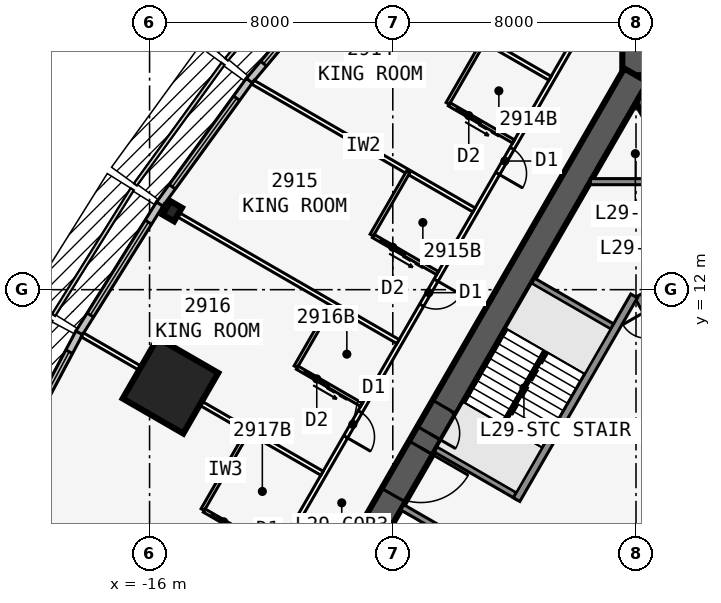
"""IFC4 building model, lengths in metres.
Left out: names, types, materials, properties, quantities, classifications, styles, units other than length and angle.
Written with IfcOpenShell. Run it as: python <this file> out.ifc"""

import sys

from ifc_helpers import new_model, si_unit, direction, frame, frame_2d, origin, origin_2d, place, context, subcontext, project, spatial, rectangle, i_section, extrude, element, fill, save


model = new_model("IFC4")
c1 = context("Model", 3, precision=1e-05, world=origin(), true_north=direction((0.0, 1.0)))
c2 = subcontext(c1, "Body", "Model", "MODEL_VIEW")
j1 = project(units=[si_unit("LENGTHUNIT", "METRE"), si_unit("PLANEANGLEUNIT", "RADIAN")], contexts=[c1])
p1 = place(None, origin())
s1 = spatial("IfcSite", under=j1, at=p1, CompositionType="ELEMENT")
p2 = place(p1, origin())
s2 = spatial("IfcBuilding", under=s1, at=p2, CompositionType="ELEMENT")
p3 = place(p2, frame((0.0, 0.0, 114.7)))
s3 = spatial("IfcBuildingStorey", under=s2, at=p3, CompositionType="ELEMENT", Elevation=114.7)
p4 = place(p3, frame((16.5, -9.526, 0.0), z_axis=(0.0, 0.0, 1.0), x_axis=(-0.499999749417, 0.866025548458, 0.0)))
e1 = element("IfcWall", 1, at=p4, inside=s3, PredefinedType="SHEAR", context=c2, shape_type="SweptSolid", body=[
    extrude(rectangle(XDim=33.0, YDim=0.9, at=frame_2d((16.5, 0.0))), origin(), (0.0, 0.0, 1.0), 3.4),
])
p5 = place(p4, frame((14.15, 0.0, 0.0)))
e2 = element("IfcOpeningElement", 2, at=p5, cuts=e1, PredefinedType="OPENING", context=c2, shape_type="SweptSolid", body=[
    extrude(rectangle(XDim=1.8, YDim=2.13, at=frame_2d((0.9, 1.065))), frame((0.0, 0.46, 0.0), z_axis=(0.0, -1.0, 0.0), x_axis=(1.0, 0.0, 0.0)), (0.0, 0.0, 1.0), 0.92),
])
p6 = place(p4, frame((12.6, 0.0, 0.0)))
e3 = element("IfcOpeningElement", 3, at=p6, cuts=e1, PredefinedType="OPENING", context=c2, shape_type="SweptSolid", body=[
    extrude(rectangle(XDim=1.0, YDim=2.13, at=frame_2d((0.5, 1.065))), frame((0.0, 0.46, 0.0), z_axis=(0.0, -1.0, 0.0), x_axis=(1.0, 0.0, 0.0)), (0.0, 0.0, 1.0), 0.92),
])
p7 = place(p3, frame((5.379, 2.586, 0.0), z_axis=(0.0, 0.0, 1.0), x_axis=(-0.500001375892, 0.866024609411, 0.0)))
e4 = element("IfcWall", 4, at=p7, inside=s3, PredefinedType="SOLIDWALL", context=c2, shape_type="SweptSolid", body=[
    extrude(rectangle(XDim=10.633, YDim=0.25, at=frame_2d((5.316, 0.0))), origin(), (0.0, 0.0, 1.0), 3.235),
])
p8 = place(p7, frame((9.164, 0.0, 0.0)))
e5 = element("IfcOpeningElement", 5, at=p8, cuts=e4, PredefinedType="OPENING", context=c2, shape_type="SweptSolid", body=[
    extrude(rectangle(XDim=0.9, YDim=2.13, at=frame_2d((0.45, 1.065))), frame((0.0, 0.135, 0.0), z_axis=(0.0, -1.0, 0.0), x_axis=(1.0, 0.0, 0.0)), (0.0, 0.0, 1.0), 0.27),
])
p9 = place(p7, frame((1.0, 0.0, 0.0)))
e6 = element("IfcOpeningElement", 6, at=p9, cuts=e4, PredefinedType="OPENING", context=c2, shape_type="SweptSolid", body=[
    extrude(rectangle(XDim=1.1, YDim=2.13, at=frame_2d((0.55, 1.065))), frame((0.0, 0.135, 0.0), z_axis=(0.0, -1.0, 0.0), x_axis=(1.0, 0.0, 0.0)), (0.0, 0.0, 1.0), 0.27),
])
p10 = place(p7, frame((3.9, 0.0, 0.0)))
e7 = element("IfcOpeningElement", 7, at=p10, cuts=e4, PredefinedType="OPENING", context=c2, shape_type="SweptSolid", body=[
    extrude(rectangle(XDim=1.1, YDim=2.13, at=frame_2d((0.55, 1.065))), frame((0.0, 0.135, 0.0), z_axis=(0.0, -1.0, 0.0), x_axis=(1.0, 0.0, 0.0)), (0.0, 0.0, 1.0), 0.27),
])
p11 = place(p7, frame((6.8, 0.0, 0.0)))
e8 = element("IfcOpeningElement", 8, at=p11, cuts=e4, PredefinedType="OPENING", context=c2, shape_type="SweptSolid", body=[
    extrude(rectangle(XDim=1.1, YDim=2.13, at=frame_2d((0.55, 1.065))), frame((0.0, 0.135, 0.0), z_axis=(0.0, -1.0, 0.0), x_axis=(1.0, 0.0, 0.0)), (0.0, 0.0, 1.0), 0.27),
])
p12 = place(p3, frame((0.0, 19.052, 0.0), z_axis=(0.0, 0.0, 1.0), x_axis=(-0.499999749417, -0.866025548458, 0.0)))
e9 = element("IfcWall", 9, at=p12, inside=s3, PredefinedType="SHEAR", context=c2, shape_type="SweptSolid", body=[
    extrude(rectangle(XDim=33.0, YDim=0.9, at=frame_2d((16.5, 0.0))), origin(), (0.0, 0.0, 1.0), 3.4),
])
p13 = place(p12, frame((14.15, 0.0, 0.0)))
e10 = element("IfcOpeningElement", 10, at=p13, cuts=e9, PredefinedType="OPENING", context=c2, shape_type="SweptSolid", body=[
    extrude(rectangle(XDim=1.8, YDim=2.13, at=frame_2d((0.9, 1.065))), frame((0.0, 0.46, 0.0), z_axis=(0.0, -1.0, 0.0), x_axis=(1.0, 0.0, 0.0)), (0.0, 0.0, 1.0), 0.92),
])
p14 = place(p12, frame((12.6, 0.0, 0.0)))
e11 = element("IfcOpeningElement", 11, at=p14, cuts=e9, PredefinedType="OPENING", context=c2, shape_type="SweptSolid", body=[
    extrude(rectangle(XDim=1.0, YDim=2.13, at=frame_2d((0.5, 1.065))), frame((0.0, 0.46, 0.0), z_axis=(0.0, -1.0, 0.0), x_axis=(1.0, 0.0, 0.0)), (0.0, 0.0, 1.0), 0.92),
])
p15 = place(p3, frame((-0.062, 11.794, 0.0), z_axis=(0.0, 0.0, 1.0), x_axis=(-0.500006680225, -0.86602154692, 0.0)))
e12 = element("IfcWall", 12, at=p15, inside=s3, PredefinedType="SOLIDWALL", context=c2, shape_type="SweptSolid", body=[
    extrude(rectangle(XDim=7.733, YDim=0.25, at=frame_2d((3.866, 0.0))), origin(), (0.0, 0.0, 1.0), 3.235),
])
for number, where, z_axis, x_axis in (
    (13, (-0.679, 10.727, 0.0), (0.0, 0.0, 1.0), (-0.866, 0.5, 0.0)),
    (14, (-3.879, 5.184, 0.0), (0.0, 0.0, 1.0), (-0.866, 0.5, 0.0)),
    (15, (-4.979, 3.279, 0.0), (0.0, 0.0, 1.0), (-0.866, 0.5, 0.0)),
):
    element("IfcWall", number, at=place(p3, frame(where, z_axis=z_axis, x_axis=x_axis)), inside=s3, PredefinedType="SOLIDWALL", context=c2, shape_type="SweptSolid", body=[
        extrude(rectangle(XDim=3.125, YDim=0.2, at=frame_2d((1.562, 0.0))), origin(), (0.0, 0.0, 1.0), 3.235),
    ])
p16 = place(p3, frame((0.0, 19.052, 0.0), z_axis=(0.0, 0.0, 1.0), x_axis=(0.0, 1.0, 0.0)))
e16 = element("IfcWall", 16, at=p16, inside=s3, PredefinedType="SHEAR", context=c2, shape_type="SweptSolid", body=[
    extrude(rectangle(XDim=4.746, YDim=0.9, at=frame_2d((2.373, 0.0))), origin(), (0.0, 0.0, 1.0), 3.4),
])
p17 = place(p16, frame((1.8, 0.0, 0.0)))
e17 = element("IfcOpeningElement", 17, at=p17, cuts=e16, PredefinedType="OPENING", context=c2, shape_type="SweptSolid", body=[
    extrude(rectangle(XDim=1.8, YDim=2.13, at=frame_2d((0.9, 1.065))), frame((0.0, 0.46, 0.0), z_axis=(0.0, -1.0, 0.0), x_axis=(1.0, 0.0, 0.0)), (0.0, 0.0, 1.0), 0.92),
])
p18 = place(p3, frame((-15.254, 14.58, 0.0), z_axis=(0.0, 0.0, 1.0), x_axis=(-0.866025403784, 0.5, 0.0)))
e18 = element("IfcColumn", 18, at=p18, inside=s3, PredefinedType="COLUMN", context=c2, shape_type="SweptSolid", body=[
    extrude(i_section(OverallWidth=0.437, OverallDepth=0.513, WebThickness=0.061, FlangeThickness=0.097, at=origin_2d()), origin(), (0.0, 0.0, 1.0), 3.4),
])
p19 = place(p3, frame((-15.312, 8.84, 0.0), z_axis=(0.0, 0.0, 1.0), x_axis=(-0.866025403784, 0.5, 0.0)))
e19 = element("IfcColumn", 19, at=p19, inside=s3, PredefinedType="COLUMN", context=c2, shape_type="SweptSolid", body=[
    extrude(rectangle(XDim=2.3, YDim=2.3, at=origin_2d()), origin(), (0.0, 0.0, 1.0), 3.4),
])
p20 = place(p3, frame((-9.465, 22.76, 0.0), z_axis=(0.0, 0.0, 1.0), x_axis=(-0.641810386606, -0.766863369607, 0.0)))
e20 = element("IfcWall", 20, at=p20, inside=s3, PredefinedType="STANDARD", context=c2, shape_type="SweptSolid", body=[
    extrude(rectangle(XDim=5.076, YDim=0.25, at=frame_2d((2.538, 0.0))), origin(), (0.0, 0.0, 1.0), 3.235),
])
p21 = place(p20, frame((0.738, 0.0, 0.45)))
e21 = element("IfcOpeningElement", 21, at=p21, cuts=e20, PredefinedType="OPENING", context=c2, shape_type="SweptSolid", body=[
    extrude(rectangle(XDim=3.6, YDim=2.4, at=frame_2d((1.8, 1.2))), frame((0.0, 0.135, 0.0), z_axis=(0.0, -1.0, 0.0), x_axis=(1.0, 0.0, 0.0)), (0.0, 0.0, 1.0), 0.27),
])
p22 = place(p3, frame((-12.718, 18.875, 0.0), z_axis=(0.0, 0.0, 1.0), x_axis=(-0.587669188412, -0.809101307001, 0.0)))
e22 = element("IfcWall", 22, at=p22, inside=s3, PredefinedType="STANDARD", context=c2, shape_type="SweptSolid", body=[
    extrude(rectangle(XDim=5.028, YDim=0.25, at=frame_2d((2.514, 0.0))), origin(), (0.0, 0.0, 1.0), 3.235),
])
p23 = place(p22, frame((0.714, 0.0, 0.45)))
e23 = element("IfcOpeningElement", 23, at=p23, cuts=e22, PredefinedType="OPENING", context=c2, shape_type="SweptSolid", body=[
    extrude(rectangle(XDim=3.6, YDim=2.4, at=frame_2d((1.8, 1.2))), frame((0.0, 0.135, 0.0), z_axis=(0.0, -1.0, 0.0), x_axis=(1.0, 0.0, 0.0)), (0.0, 0.0, 1.0), 0.27),
])
p24 = place(p3, frame((-15.667, 14.814, 0.0), z_axis=(0.0, 0.0, 1.0), x_axis=(-0.529990167382, -0.84800378683, 0.0)))
e24 = element("IfcWall", 24, at=p24, inside=s3, PredefinedType="STANDARD", context=c2, shape_type="SweptSolid", body=[
    extrude(rectangle(XDim=5.003, YDim=0.25, at=frame_2d((2.501, 0.0))), origin(), (0.0, 0.0, 1.0), 3.235),
])
p25 = place(p24, frame((0.701, 0.0, 0.45)))
e25 = element("IfcOpeningElement", 25, at=p25, cuts=e24, PredefinedType="OPENING", context=c2, shape_type="SweptSolid", body=[
    extrude(rectangle(XDim=3.6, YDim=2.4, at=frame_2d((1.8, 1.2))), frame((0.0, 0.135, 0.0), z_axis=(0.0, -1.0, 0.0), x_axis=(1.0, 0.0, 0.0)), (0.0, 0.0, 1.0), 0.27),
])
p26 = place(p3, frame((-18.314, 10.579, 0.0), z_axis=(0.0, 0.0, 1.0), x_axis=(-0.469404966864, -0.882982999317, 0.0)))
e26 = element("IfcWall", 26, at=p26, inside=s3, PredefinedType="STANDARD", context=c2, shape_type="SweptSolid", body=[
    extrude(rectangle(XDim=5.003, YDim=0.25, at=frame_2d((2.501, 0.0))), origin(), (0.0, 0.0, 1.0), 3.235),
])
p27 = place(p26, frame((0.701, 0.0, 0.45)))
e27 = element("IfcOpeningElement", 27, at=p27, cuts=e26, PredefinedType="OPENING", context=c2, shape_type="SweptSolid", body=[
    extrude(rectangle(XDim=3.6, YDim=2.4, at=frame_2d((1.8, 1.2))), frame((0.0, 0.135, 0.0), z_axis=(0.0, -1.0, 0.0), x_axis=(1.0, 0.0, 0.0)), (0.0, 0.0, 1.0), 0.27),
])
p28 = place(p3, frame((-0.5, 22.836, 0.0), z_axis=(0.0, 0.0, 1.0), x_axis=(-0.500001677587, -0.866024435227, 0.0)))
e28 = element("IfcWall", 28, at=p28, inside=s3, PredefinedType="PARTITIONING", context=c2, shape_type="SweptSolid", body=[
    extrude(rectangle(XDim=39.054, YDim=0.15, at=frame_2d((19.527, 0.0))), origin(), (0.0, 0.0, 1.0), 3.235),
])
p29 = place(p28, frame((0.352, 0.0, 0.0)))
e29 = element("IfcOpeningElement", 29, at=p29, cuts=e28, PredefinedType="OPENING", context=c2, shape_type="SweptSolid", body=[
    extrude(rectangle(XDim=0.95, YDim=2.13, at=frame_2d((0.475, 1.065))), frame((0.0, 0.085, 0.0), z_axis=(0.0, -1.0, 0.0), x_axis=(1.0, 0.0, 0.0)), (0.0, 0.0, 1.0), 0.17),
])
p30 = place(p28, frame((7.152, 0.0, 0.0)))
e30 = element("IfcOpeningElement", 30, at=p30, cuts=e28, PredefinedType="OPENING", context=c2, shape_type="SweptSolid", body=[
    extrude(rectangle(XDim=0.95, YDim=2.13, at=frame_2d((0.475, 1.065))), frame((0.0, 0.085, 0.0), z_axis=(0.0, -1.0, 0.0), x_axis=(1.0, 0.0, 0.0)), (0.0, 0.0, 1.0), 0.17),
])
p31 = place(p28, frame((12.152, 0.0, 0.0)))
e31 = element("IfcOpeningElement", 31, at=p31, cuts=e28, PredefinedType="OPENING", context=c2, shape_type="SweptSolid", body=[
    extrude(rectangle(XDim=0.95, YDim=2.13, at=frame_2d((0.475, 1.065))), frame((0.0, 0.085, 0.0), z_axis=(0.0, -1.0, 0.0), x_axis=(1.0, 0.0, 0.0)), (0.0, 0.0, 1.0), 0.17),
])
p32 = place(p28, frame((17.152, 0.0, 0.0)))
e32 = element("IfcOpeningElement", 32, at=p32, cuts=e28, PredefinedType="OPENING", context=c2, shape_type="SweptSolid", body=[
    extrude(rectangle(XDim=0.95, YDim=2.13, at=frame_2d((0.475, 1.065))), frame((0.0, 0.085, 0.0), z_axis=(0.0, -1.0, 0.0), x_axis=(1.0, 0.0, 0.0)), (0.0, 0.0, 1.0), 0.17),
])
p33 = place(p28, frame((22.752, 0.0, 0.0)))
e33 = element("IfcOpeningElement", 33, at=p33, cuts=e28, PredefinedType="OPENING", context=c2, shape_type="SweptSolid", body=[
    extrude(rectangle(XDim=0.95, YDim=2.13, at=frame_2d((0.475, 1.065))), frame((0.0, 0.085, 0.0), z_axis=(0.0, -1.0, 0.0), x_axis=(1.0, 0.0, 0.0)), (0.0, 0.0, 1.0), 0.17),
])
p34 = place(p28, frame((32.152, 0.0, 0.0)))
e34 = element("IfcOpeningElement", 34, at=p34, cuts=e28, PredefinedType="OPENING", context=c2, shape_type="SweptSolid", body=[
    extrude(rectangle(XDim=0.95, YDim=2.13, at=frame_2d((0.475, 1.065))), frame((0.0, 0.085, 0.0), z_axis=(0.0, -1.0, 0.0), x_axis=(1.0, 0.0, 0.0)), (0.0, 0.0, 1.0), 0.17),
])
p35 = place(p28, frame((37.752, 0.0, 0.0)))
e35 = element("IfcOpeningElement", 35, at=p35, cuts=e28, PredefinedType="OPENING", context=c2, shape_type="SweptSolid", body=[
    extrude(rectangle(XDim=0.95, YDim=2.13, at=frame_2d((0.475, 1.065))), frame((0.0, 0.085, 0.0), z_axis=(0.0, -1.0, 0.0), x_axis=(1.0, 0.0, 0.0)), (0.0, 0.0, 1.0), 0.17),
])
p36 = place(p3, frame((-2.829, 18.954, 0.0), z_axis=(0.0, 0.0, 1.0), x_axis=(-0.866015739374, 0.500016738876, 0.0)))
e36 = element("IfcWall", 36, at=p36, inside=s3, PredefinedType="PARTITIONING", context=c2, shape_type="SweptSolid", body=[
    extrude(rectangle(XDim=7.516, YDim=0.15, at=frame_2d((3.758, 0.0))), origin(), (0.0, 0.0, 1.0), 2.389),
])
p37 = place(p3, frame((-5.329, 14.623, 0.0), z_axis=(0.0, 0.0, 1.0), x_axis=(-0.866011723728, 0.500023693804, 0.0)))
e37 = element("IfcWall", 37, at=p37, inside=s3, PredefinedType="PARTITIONING", context=c2, shape_type="SweptSolid", body=[
    extrude(rectangle(XDim=8.395, YDim=0.15, at=frame_2d((4.198, 0.0))), origin(), (0.0, 0.0, 1.0), 2.389),
])
p38 = place(p3, frame((-7.829, 10.293, 0.0), z_axis=(0.0, 0.0, 1.0), x_axis=(-0.866027015393, 0.499997208602, 0.0)))
e38 = element("IfcWall", 38, at=p38, inside=s3, PredefinedType="PARTITIONING", context=c2, shape_type="SweptSolid", body=[
    extrude(rectangle(XDim=8.922, YDim=0.15, at=frame_2d((4.461, 0.0))), origin(), (0.0, 0.0, 1.0), 2.389),
])
p39 = place(p3, frame((-10.329, 5.963, 0.0), z_axis=(0.0, 0.0, 1.0), x_axis=(-0.866025170687, 0.500000403736, 0.0)))
e39 = element("IfcWall", 39, at=p39, inside=s3, PredefinedType="PARTITIONING", context=c2, shape_type="SweptSolid", body=[
    extrude(rectangle(XDim=9.099, YDim=0.15, at=frame_2d((4.549, 0.0))), origin(), (0.0, 0.0, 1.0), 2.389),
])
p40 = place(p3, frame((-4.993, 20.204, 0.0), z_axis=(0.0, 0.0, 1.0), x_axis=(-0.500033551112, -0.866006032174, 0.0)))
e40 = element("IfcWall", 40, at=p40, inside=s3, PredefinedType="PLUMBINGWALL", context=c2, shape_type="SweptSolid", body=[
    extrude(rectangle(XDim=2.4, YDim=0.12, at=frame_2d((1.2, 0.0))), origin(), (0.0, 0.0, 1.0), 3.235),
])
p41 = place(p3, frame((-4.029, 16.875, 0.0), z_axis=(0.0, 0.0, 1.0), x_axis=(-0.865980627057, 0.500077547548, 0.0)))
e41 = element("IfcWall", 41, at=p41, inside=s3, PredefinedType="PLUMBINGWALL", context=c2, shape_type="SweptSolid", body=[
    extrude(rectangle(XDim=2.44, YDim=0.12, at=frame_2d((1.22, 0.0))), origin(), (0.0, 0.0, 1.0), 3.235),
])
p42 = place(p41, frame((1.25, 0.0, 0.0)))
e42 = element("IfcOpeningElement", 42, at=p42, cuts=e41, PredefinedType="OPENING", context=c2, shape_type="SweptSolid", body=[
    extrude(rectangle(XDim=0.9, YDim=2.13, at=frame_2d((0.45, 1.065))), frame((0.0, 0.07, 0.0), z_axis=(0.0, -1.0, 0.0), x_axis=(1.0, 0.0, 0.0)), (0.0, 0.0, 1.0), 0.14),
])
p43 = place(p3, frame((-7.493, 15.873, 0.0), z_axis=(0.0, 0.0, 1.0), x_axis=(-0.500077600433, -0.865980596518, 0.0)))
e43 = element("IfcWall", 43, at=p43, inside=s3, PredefinedType="PLUMBINGWALL", context=c2, shape_type="SweptSolid", body=[
    extrude(rectangle(XDim=2.4, YDim=0.12, at=frame_2d((1.2, 0.0))), origin(), (0.0, 0.0, 1.0), 3.235),
])
p44 = place(p3, frame((-6.529, 12.545, 0.0), z_axis=(0.0, 0.0, 1.0), x_axis=(-0.866023955769, 0.500002508028, 0.0)))
e44 = element("IfcWall", 44, at=p44, inside=s3, PredefinedType="PLUMBINGWALL", context=c2, shape_type="SweptSolid", body=[
    extrude(rectangle(XDim=2.44, YDim=0.12, at=frame_2d((1.22, 0.0))), origin(), (0.0, 0.0, 1.0), 3.235),
])
p45 = place(p44, frame((1.25, 0.0, 0.0)))
e45 = element("IfcOpeningElement", 45, at=p45, cuts=e44, PredefinedType="OPENING", context=c2, shape_type="SweptSolid", body=[
    extrude(rectangle(XDim=0.9, YDim=2.13, at=frame_2d((0.45, 1.065))), frame((0.0, 0.07, 0.0), z_axis=(0.0, -1.0, 0.0), x_axis=(1.0, 0.0, 0.0)), (0.0, 0.0, 1.0), 0.14),
])
p46 = place(p3, frame((-9.993, 11.543, 0.0), z_axis=(0.0, 0.0, 1.0), x_axis=(-0.500077600433, -0.865980596518, 0.0)))
e46 = element("IfcWall", 46, at=p46, inside=s3, PredefinedType="PLUMBINGWALL", context=c2, shape_type="SweptSolid", body=[
    extrude(rectangle(XDim=2.4, YDim=0.12, at=frame_2d((1.2, 0.0))), origin(), (0.0, 0.0, 1.0), 3.235),
])
p47 = place(p3, frame((-9.029, 8.215, 0.0), z_axis=(0.0, 0.0, 1.0), x_axis=(-0.866023955769, 0.500002508028, 0.0)))
e47 = element("IfcWall", 47, at=p47, inside=s3, PredefinedType="PLUMBINGWALL", context=c2, shape_type="SweptSolid", body=[
    extrude(rectangle(XDim=2.44, YDim=0.12, at=frame_2d((1.22, 0.0))), origin(), (0.0, 0.0, 1.0), 3.235),
])
p48 = place(p47, frame((1.25, 0.0, 0.0)))
e48 = element("IfcOpeningElement", 48, at=p48, cuts=e47, PredefinedType="OPENING", context=c2, shape_type="SweptSolid", body=[
    extrude(rectangle(XDim=0.9, YDim=2.13, at=frame_2d((0.45, 1.065))), frame((0.0, 0.07, 0.0), z_axis=(0.0, -1.0, 0.0), x_axis=(1.0, 0.0, 0.0)), (0.0, 0.0, 1.0), 0.14),
])
p49 = place(p3, frame((-12.753, 7.363, 0.0), z_axis=(0.0, 0.0, 1.0), x_axis=(-0.50002537861, -0.866010750942, 0.0)))
e49 = element("IfcWall", 49, at=p49, inside=s3, PredefinedType="PLUMBINGWALL", context=c2, shape_type="SweptSolid", body=[
    extrude(rectangle(XDim=3.0, YDim=0.12, at=frame_2d((1.5, 0.0))), origin(), (0.0, 0.0, 1.0), 3.235),
])
p50 = place(p3, frame((-11.829, 3.365, 0.0), z_axis=(0.0, 0.0, 1.0), x_axis=(-0.865997131366, 0.500048966069, 0.0)))
e50 = element("IfcWall", 50, at=p50, inside=s3, PredefinedType="PLUMBINGWALL", context=c2, shape_type="SweptSolid", body=[
    extrude(rectangle(XDim=2.74, YDim=0.12, at=frame_2d((1.37, 0.0))), origin(), (0.0, 0.0, 1.0), 3.235),
])
p51 = place(p50, frame((1.55, 0.0, 0.0)))
e51 = element("IfcOpeningElement", 51, at=p51, cuts=e50, PredefinedType="OPENING", context=c2, shape_type="SweptSolid", body=[
    extrude(rectangle(XDim=0.9, YDim=2.13, at=frame_2d((0.45, 1.065))), frame((0.0, 0.07, 0.0), z_axis=(0.0, -1.0, 0.0), x_axis=(1.0, 0.0, 0.0)), (0.0, 0.0, 1.0), 0.14),
])
p52 = place(p3, frame((-1.501, 15.552, 0.0), z_axis=(0.0, 0.0, 1.0), x_axis=(1.0, 0.0, 0.0)))
e52 = element("IfcWall", 52, at=p52, inside=s3, PredefinedType="SOLIDWALL", context=c2, shape_type="SweptSolid", body=[
    extrude(rectangle(XDim=3.002, YDim=0.2, at=frame_2d((1.501, 0.0))), origin(), (0.0, 0.0, 1.0), 3.235),
])
p53 = place(p3, frame((-2.988, 9.978, 0.0), z_axis=(0.0, 0.0, 1.0), x_axis=(-0.499992232847, -0.866029888106, 0.0)))
e53 = element("IfcWall", 53, at=p53, inside=s3, PredefinedType="SOLIDWALL", context=c2, shape_type="SweptSolid", body=[
    extrude(rectangle(XDim=2.794, YDim=0.1, at=frame_2d((1.397, 0.0))), origin(), (0.0, 0.0, 1.0), 3.4),
])
p54 = place(p21, origin())
e54 = element("IfcWindow", 54, at=p54, inside=s3, PartitioningType="SINGLE_PANEL", PredefinedType="WINDOW", context=c2, shape_type="SweptSolid", body=[
    extrude(rectangle(XDim=3.6, YDim=2.4, at=frame_2d((1.8, 1.2))), frame((0.0, 0.03, 0.0), z_axis=(0.0, -1.0, 0.0), x_axis=(1.0, 0.0, 0.0)), (0.0, 0.0, 1.0), 0.06),
])
fill(e21, e54)
p55 = place(p23, origin())
e55 = element("IfcWindow", 55, at=p55, inside=s3, PartitioningType="SINGLE_PANEL", PredefinedType="WINDOW", context=c2, shape_type="SweptSolid", body=[
    extrude(rectangle(XDim=3.6, YDim=2.4, at=frame_2d((1.8, 1.2))), frame((0.0, 0.03, 0.0), z_axis=(0.0, -1.0, 0.0), x_axis=(1.0, 0.0, 0.0)), (0.0, 0.0, 1.0), 0.06),
])
fill(e23, e55)
p56 = place(p25, origin())
e56 = element("IfcWindow", 56, at=p56, inside=s3, PartitioningType="SINGLE_PANEL", PredefinedType="WINDOW", context=c2, shape_type="SweptSolid", body=[
    extrude(rectangle(XDim=3.6, YDim=2.4, at=frame_2d((1.8, 1.2))), frame((0.0, 0.03, 0.0), z_axis=(0.0, -1.0, 0.0), x_axis=(1.0, 0.0, 0.0)), (0.0, 0.0, 1.0), 0.06),
])
fill(e25, e56)
p57 = place(p27, origin())
e57 = element("IfcWindow", 57, at=p57, inside=s3, PartitioningType="SINGLE_PANEL", PredefinedType="WINDOW", context=c2, shape_type="SweptSolid", body=[
    extrude(rectangle(XDim=3.6, YDim=2.4, at=frame_2d((1.8, 1.2))), frame((0.0, 0.03, 0.0), z_axis=(0.0, -1.0, 0.0), x_axis=(1.0, 0.0, 0.0)), (0.0, 0.0, 1.0), 0.06),
])
fill(e27, e57)
p58 = place(p42, origin())
e58 = element("IfcDoor", 58, at=p58, inside=s3, OperationType="SLIDING_TO_LEFT", PredefinedType="DOOR", context=c2, shape_type="SweptSolid", body=[
    extrude(rectangle(XDim=0.9, YDim=2.13, at=frame_2d((0.45, 1.065))), frame((0.0, 0.025, 0.0), z_axis=(0.0, -1.0, 0.0), x_axis=(1.0, 0.0, 0.0)), (0.0, 0.0, 1.0), 0.05),
])
fill(e42, e58)
p59 = place(p30, origin())
e59 = element("IfcDoor", 59, at=p59, inside=s3, OperationType="SINGLE_SWING_RIGHT", PredefinedType="DOOR", context=c2, shape_type="SweptSolid", body=[
    extrude(rectangle(XDim=0.95, YDim=2.13, at=frame_2d((0.475, 1.065))), frame((0.0, 0.025, 0.0), z_axis=(0.0, -1.0, 0.0), x_axis=(1.0, 0.0, 0.0)), (0.0, 0.0, 1.0), 0.05),
])
fill(e30, e59)
p60 = place(p45, origin())
e60 = element("IfcDoor", 60, at=p60, inside=s3, OperationType="SLIDING_TO_LEFT", PredefinedType="DOOR", context=c2, shape_type="SweptSolid", body=[
    extrude(rectangle(XDim=0.9, YDim=2.13, at=frame_2d((0.45, 1.065))), frame((0.0, 0.025, 0.0), z_axis=(0.0, -1.0, 0.0), x_axis=(1.0, 0.0, 0.0)), (0.0, 0.0, 1.0), 0.05),
])
fill(e45, e60)
p61 = place(p31, origin())
e61 = element("IfcDoor", 61, at=p61, inside=s3, OperationType="SINGLE_SWING_LEFT", PredefinedType="DOOR", context=c2, shape_type="SweptSolid", body=[
    extrude(rectangle(XDim=0.95, YDim=2.13, at=frame_2d((0.475, 1.065))), frame((0.0, 0.025, 0.0), z_axis=(0.0, -1.0, 0.0), x_axis=(1.0, 0.0, 0.0)), (0.0, 0.0, 1.0), 0.05),
])
fill(e31, e61)
p62 = place(p48, origin())
e62 = element("IfcDoor", 62, at=p62, inside=s3, OperationType="SLIDING_TO_LEFT", PredefinedType="DOOR", context=c2, shape_type="SweptSolid", body=[
    extrude(rectangle(XDim=0.9, YDim=2.13, at=frame_2d((0.45, 1.065))), frame((0.0, 0.025, 0.0), z_axis=(0.0, -1.0, 0.0), x_axis=(1.0, 0.0, 0.0)), (0.0, 0.0, 1.0), 0.05),
])
fill(e48, e62)
p63 = place(p32, origin())
e63 = element("IfcDoor", 63, at=p63, inside=s3, OperationType="SINGLE_SWING_RIGHT", PredefinedType="DOOR", context=c2, shape_type="SweptSolid", body=[
    extrude(rectangle(XDim=0.95, YDim=2.13, at=frame_2d((0.475, 1.065))), frame((0.0, 0.025, 0.0), z_axis=(0.0, -1.0, 0.0), x_axis=(1.0, 0.0, 0.0)), (0.0, 0.0, 1.0), 0.05),
])
fill(e32, e63)
p64 = place(p51, origin())
e64 = element("IfcDoor", 64, at=p64, inside=s3, OperationType="SLIDING_TO_LEFT", PredefinedType="DOOR", context=c2, shape_type="SweptSolid", body=[
    extrude(rectangle(XDim=0.9, YDim=2.13, at=frame_2d((0.45, 1.065))), frame((0.0, 0.025, 0.0), z_axis=(0.0, -1.0, 0.0), x_axis=(1.0, 0.0, 0.0)), (0.0, 0.0, 1.0), 0.05),
])
fill(e51, e64)
p65 = place(p13, origin())
e65 = element("IfcDoor", 65, at=p65, inside=s3, OperationType="DOUBLE_DOOR_SINGLE_SWING", PredefinedType="DOOR", context=c2, shape_type="SweptSolid", body=[
    extrude(rectangle(XDim=1.8, YDim=2.13, at=frame_2d((0.9, 1.065))), frame((0.0, 0.025, 0.0), z_axis=(0.0, -1.0, 0.0), x_axis=(1.0, 0.0, 0.0)), (0.0, 0.0, 1.0), 0.05),
])
fill(e10, e65)
p66 = place(p14, origin())
e66 = element("IfcDoor", 66, at=p66, inside=s3, OperationType="SINGLE_SWING_RIGHT", PredefinedType="DOOR", context=c2, shape_type="SweptSolid", body=[
    extrude(rectangle(XDim=1.0, YDim=2.13, at=frame_2d((0.5, 1.065))), frame((0.0, 0.025, 0.0), z_axis=(0.0, -1.0, 0.0), x_axis=(1.0, 0.0, 0.0)), (0.0, 0.0, 1.0), 0.05),
])
fill(e11, e66)
save(model, sys.argv[1])
